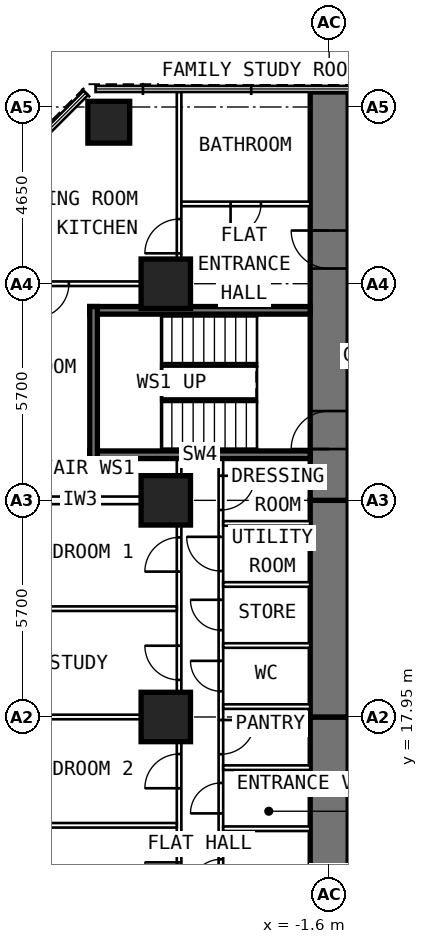
"""IFC4 building model, lengths in metres.
Left out: names, types, materials, properties, quantities, classifications, styles, units other than length and angle.
Written with IfcOpenShell. Run it as: python <this file> out.ifc"""

import sys

from ifc_helpers import new_model, si_unit, direction, frame, frame_2d, origin, origin_2d, place, context, subcontext, project, spatial, rectangle, extrude, element, fill, save


model = new_model("IFC4")
c1 = context("Model", 3, precision=1e-05, world=origin(), true_north=direction((0.0, 1.0)))
c2 = subcontext(c1, "Body", "Model", "MODEL_VIEW")
j1 = project(units=[si_unit("LENGTHUNIT", "METRE"), si_unit("PLANEANGLEUNIT", "RADIAN")], contexts=[c1])
p1 = place(None, origin())
s1 = spatial("IfcSite", under=j1, at=p1, CompositionType="ELEMENT")
p2 = place(p1, origin())
s2 = spatial("IfcBuilding", under=s1, at=p2, CompositionType="ELEMENT")
p3 = place(p2, frame((0.0, 0.0, 43.0)))
s3 = spatial("IfcBuildingStorey", under=s2, at=p3, CompositionType="ELEMENT", Elevation=43.0)
p4 = place(p3, frame((-7.4, 33.6, 0.0), z_axis=(0.0, 0.0, 1.0), x_axis=(0.0, 1.0, 0.0)))
e1 = element("IfcColumn", 1, at=p4, inside=s3, PredefinedType="COLUMN", context=c2, shape_type="SweptSolid", body=[
    extrude(rectangle(XDim=1.1, YDim=1.1, at=origin_2d()), origin(), (0.0, 0.0, 1.0), 3.6),
])
for number, where, z_axis, x_axis in (
    (2, (-5.9, 17.95, 0.0), (0.0, 0.0, 1.0), (0.0, 1.0, 0.0)),
    (3, (-5.9, 23.65, 0.0), (0.0, 0.0, 1.0), (0.0, 1.0, 0.0)),
    (4, (-5.9, 29.35, 0.0), (0.0, 0.0, 1.0), (0.0, 1.0, 0.0)),
):
    element("IfcColumn", number, at=place(p3, frame(where, z_axis=z_axis, x_axis=x_axis)), inside=s3, PredefinedType="COLUMN", context=c2, shape_type="SweptSolid", body=[
        extrude(rectangle(XDim=1.3, YDim=1.3, at=origin_2d()), origin(), (0.0, 0.0, 1.0), 3.6),
    ])
p5 = place(p3, frame((-1.6, 9.6, 0.0), z_axis=(0.0, 0.0, 1.0), x_axis=(0.0, 1.0, 0.0)))
e5 = element("IfcWall", 5, at=p5, inside=s3, PredefinedType="SHEAR", context=c2, shape_type="SweptSolid", body=[
    extrude(rectangle(XDim=8.35, YDim=1.0, at=frame_2d((4.175, 0.0))), origin(), (0.0, 0.0, 1.0), 3.6),
])
p6 = place(p5, frame((1.3, 0.0, 0.0)))
e6 = element("IfcOpeningElement", 6, at=p6, cuts=e5, PredefinedType="OPENING", context=c2, shape_type="SweptSolid", body=[
    extrude(rectangle(XDim=1.0, YDim=2.1, at=frame_2d((0.5, 1.05))), frame((0.0, 0.512, 0.0), z_axis=(0.0, -1.0, 0.0), x_axis=(1.0, 0.0, 0.0)), (0.0, 0.0, 1.0), 1.024),
])
p7 = place(p3, frame((-1.6, 17.95, 0.0), z_axis=(0.0, 0.0, 1.0), x_axis=(0.0, 1.0, 0.0)))
e7 = element("IfcWall", 7, at=p7, inside=s3, PredefinedType="SHEAR", context=c2, shape_type="SweptSolid", body=[
    extrude(rectangle(XDim=5.7, YDim=1.0, at=frame_2d((2.85, 0.0))), origin(), (0.0, 0.0, 1.0), 3.6),
])
p8 = place(p3, frame((-1.6, 23.65, 0.0), z_axis=(0.0, 0.0, 1.0), x_axis=(0.0, 1.0, 0.0)))
e8 = element("IfcWall", 8, at=p8, inside=s3, PredefinedType="SHEAR", context=c2, shape_type="SweptSolid", body=[
    extrude(rectangle(XDim=10.745, YDim=1.0, at=frame_2d((5.373, 0.0))), origin(), (0.0, 0.0, 1.0), 3.6),
])
p9 = place(p8, frame((6.1, 0.0, 0.0)))
e9 = element("IfcOpeningElement", 9, at=p9, cuts=e8, PredefinedType="OPENING", context=c2, shape_type="SweptSolid", body=[
    extrude(rectangle(XDim=1.0, YDim=2.1, at=frame_2d((0.5, 1.05))), frame((0.0, 0.512, 0.0), z_axis=(0.0, -1.0, 0.0), x_axis=(1.0, 0.0, 0.0)), (0.0, 0.0, 1.0), 1.024),
])
p10 = place(p8, frame((1.35, 0.0, 0.0)))
e10 = element("IfcOpeningElement", 10, at=p10, cuts=e8, PredefinedType="OPENING", context=c2, shape_type="SweptSolid", body=[
    extrude(rectangle(XDim=1.0, YDim=2.1, at=frame_2d((0.5, 1.05))), frame((0.0, 0.512, 0.0), z_axis=(0.0, -1.0, 0.0), x_axis=(1.0, 0.0, 0.0)), (0.0, 0.0, 1.0), 1.024),
])
p11 = place(p3, frame((-4.45, 10.1, 0.0), z_axis=(0.0, 0.0, 1.0), x_axis=(0.0, 1.0, 0.0)))
e11 = element("IfcWall", 11, at=p11, inside=s3, PredefinedType="PARTITIONING", context=c2, shape_type="SweptSolid", body=[
    extrude(rectangle(XDim=14.65, YDim=0.12, at=frame_2d((7.325, 0.0))), origin(), (0.0, 0.0, 1.0), 3.35),
])
p12 = place(p11, frame((0.75, 0.0, 0.0)))
e12 = element("IfcOpeningElement", 12, at=p12, cuts=e11, PredefinedType="OPENING", context=c2, shape_type="SweptSolid", body=[
    extrude(rectangle(XDim=0.9, YDim=2.1, at=frame_2d((0.45, 1.05))), frame((0.0, 0.072, 0.0), z_axis=(0.0, -1.0, 0.0), x_axis=(1.0, 0.0, 0.0)), (0.0, 0.0, 1.0), 0.144),
])
p13 = place(p11, frame((3.305, 0.0, 0.0)))
e13 = element("IfcOpeningElement", 13, at=p13, cuts=e11, PredefinedType="OPENING", context=c2, shape_type="SweptSolid", body=[
    extrude(rectangle(XDim=0.8, YDim=2.1, at=frame_2d((0.4, 1.05))), frame((0.0, 0.072, 0.0), z_axis=(0.0, -1.0, 0.0), x_axis=(1.0, 0.0, 0.0)), (0.0, 0.0, 1.0), 0.144),
])
p14 = place(p11, frame((5.313, 0.0, 0.0)))
e14 = element("IfcOpeningElement", 14, at=p14, cuts=e11, PredefinedType="OPENING", context=c2, shape_type="SweptSolid", body=[
    extrude(rectangle(XDim=0.8, YDim=2.1, at=frame_2d((0.4, 1.05))), frame((0.0, 0.072, 0.0), z_axis=(0.0, -1.0, 0.0), x_axis=(1.0, 0.0, 0.0)), (0.0, 0.0, 1.0), 0.144),
])
p15 = place(p11, frame((6.87, 0.0, 0.0)))
e15 = element("IfcOpeningElement", 15, at=p15, cuts=e11, PredefinedType="OPENING", context=c2, shape_type="SweptSolid", body=[
    extrude(rectangle(XDim=0.9, YDim=2.1, at=frame_2d((0.45, 1.05))), frame((0.0, 0.072, 0.0), z_axis=(0.0, -1.0, 0.0), x_axis=(1.0, 0.0, 0.0)), (0.0, 0.0, 1.0), 0.144),
])
p16 = place(p11, frame((8.527, 0.0, 0.0)))
e16 = element("IfcOpeningElement", 16, at=p16, cuts=e11, PredefinedType="OPENING", context=c2, shape_type="SweptSolid", body=[
    extrude(rectangle(XDim=0.8, YDim=2.1, at=frame_2d((0.4, 1.05))), frame((0.0, 0.072, 0.0), z_axis=(0.0, -1.0, 0.0), x_axis=(1.0, 0.0, 0.0)), (0.0, 0.0, 1.0), 0.144),
])
p17 = place(p11, frame((10.133, 0.0, 0.0)))
e17 = element("IfcOpeningElement", 17, at=p17, cuts=e11, PredefinedType="OPENING", context=c2, shape_type="SweptSolid", body=[
    extrude(rectangle(XDim=0.8, YDim=2.1, at=frame_2d((0.4, 1.05))), frame((0.0, 0.072, 0.0), z_axis=(0.0, -1.0, 0.0), x_axis=(1.0, 0.0, 0.0)), (0.0, 0.0, 1.0), 0.144),
])
p18 = place(p11, frame((11.69, 0.0, 0.0)))
e18 = element("IfcOpeningElement", 18, at=p18, cuts=e11, PredefinedType="OPENING", context=c2, shape_type="SweptSolid", body=[
    extrude(rectangle(XDim=0.9, YDim=2.1, at=frame_2d((0.45, 1.05))), frame((0.0, 0.072, 0.0), z_axis=(0.0, -1.0, 0.0), x_axis=(1.0, 0.0, 0.0)), (0.0, 0.0, 1.0), 0.144),
])
p19 = place(p11, frame((13.297, 0.0, 0.0)))
e19 = element("IfcOpeningElement", 19, at=p19, cuts=e11, PredefinedType="OPENING", context=c2, shape_type="SweptSolid", body=[
    extrude(rectangle(XDim=0.9, YDim=2.1, at=frame_2d((0.45, 1.05))), frame((0.0, 0.072, 0.0), z_axis=(0.0, -1.0, 0.0), x_axis=(1.0, 0.0, 0.0)), (0.0, 0.0, 1.0), 0.144),
])
p20 = place(p3, frame((-5.55, 9.691, 0.0), z_axis=(0.0, 0.0, 1.0), x_axis=(0.0, 1.0, 0.0)))
e20 = element("IfcWall", 20, at=p20, inside=s3, PredefinedType="PARTITIONING", context=c2, shape_type="SweptSolid", body=[
    extrude(rectangle(XDim=15.059, YDim=0.12, at=frame_2d((7.53, 0.0))), origin(), (0.0, 0.0, 1.0), 3.35),
])
p21 = place(p20, frame((0.859, 0.0, 0.0)))
e21 = element("IfcOpeningElement", 21, at=p21, cuts=e20, PredefinedType="OPENING", context=c2, shape_type="SweptSolid", body=[
    extrude(rectangle(XDim=0.9, YDim=2.1, at=frame_2d((0.45, 1.05))), frame((0.0, 0.072, 0.0), z_axis=(0.0, -1.0, 0.0), x_axis=(1.0, 0.0, 0.0)), (0.0, 0.0, 1.0), 0.144),
])
p22 = place(p20, frame((3.534, 0.0, 0.0)))
e22 = element("IfcOpeningElement", 22, at=p22, cuts=e20, PredefinedType="OPENING", context=c2, shape_type="SweptSolid", body=[
    extrude(rectangle(XDim=0.9, YDim=2.1, at=frame_2d((0.45, 1.05))), frame((0.0, 0.072, 0.0), z_axis=(0.0, -1.0, 0.0), x_axis=(1.0, 0.0, 0.0)), (0.0, 0.0, 1.0), 0.144),
])
p23 = place(p20, frame((6.384, 0.0, 0.0)))
e23 = element("IfcOpeningElement", 23, at=p23, cuts=e20, PredefinedType="OPENING", context=c2, shape_type="SweptSolid", body=[
    extrude(rectangle(XDim=0.9, YDim=2.1, at=frame_2d((0.45, 1.05))), frame((0.0, 0.072, 0.0), z_axis=(0.0, -1.0, 0.0), x_axis=(1.0, 0.0, 0.0)), (0.0, 0.0, 1.0), 0.144),
])
p24 = place(p20, frame((9.234, 0.0, 0.0)))
e24 = element("IfcOpeningElement", 24, at=p24, cuts=e20, PredefinedType="OPENING", context=c2, shape_type="SweptSolid", body=[
    extrude(rectangle(XDim=0.9, YDim=2.1, at=frame_2d((0.45, 1.05))), frame((0.0, 0.072, 0.0), z_axis=(0.0, -1.0, 0.0), x_axis=(1.0, 0.0, 0.0)), (0.0, 0.0, 1.0), 0.144),
])
p25 = place(p20, frame((12.084, 0.0, 0.0)))
e25 = element("IfcOpeningElement", 25, at=p25, cuts=e20, PredefinedType="OPENING", context=c2, shape_type="SweptSolid", body=[
    extrude(rectangle(XDim=0.9, YDim=2.1, at=frame_2d((0.45, 1.05))), frame((0.0, 0.072, 0.0), z_axis=(0.0, -1.0, 0.0), x_axis=(1.0, 0.0, 0.0)), (0.0, 0.0, 1.0), 0.144),
])
p26 = place(p3, frame((-5.61, 15.1, 0.0), z_axis=(0.0, 0.0, 1.0), x_axis=(-1.0, 0.0, 0.0)))
e26 = element("IfcWall", 26, at=p26, inside=s3, PredefinedType="PARTITIONING", context=c2, shape_type="SweptSolid", body=[
    extrude(rectangle(XDim=5.09, YDim=0.12, at=frame_2d((2.545, 0.0))), origin(), (0.0, 0.0, 1.0), 3.35),
])
p27 = place(p3, frame((-5.61, 17.95, 0.0), z_axis=(0.0, 0.0, 1.0), x_axis=(-1.0, 0.0, 0.0)))
e27 = element("IfcWall", 27, at=p27, inside=s3, PredefinedType="PARTITIONING", context=c2, shape_type="SweptSolid", body=[
    extrude(rectangle(XDim=5.09, YDim=0.12, at=frame_2d((2.545, 0.0))), origin(), (0.0, 0.0, 1.0), 2.45),
])
p28 = place(p3, frame((-5.61, 20.8, 0.0), z_axis=(0.0, 0.0, 1.0), x_axis=(-1.0, 0.0, 0.0)))
e28 = element("IfcWall", 28, at=p28, inside=s3, PredefinedType="PARTITIONING", context=c2, shape_type="SweptSolid", body=[
    extrude(rectangle(XDim=5.09, YDim=0.12, at=frame_2d((2.545, 0.0))), origin(), (0.0, 0.0, 1.0), 3.35),
])
for number, where, z_axis, x_axis in (
    (29, (-2.1, 15.01, 0.0), (0.0, 0.0, 1.0), (-1.0, 0.0, 0.0)),
    (30, (-2.1, 16.617, 0.0), (0.0, 0.0, 1.0), (-1.0, 0.0, 0.0)),
):
    element("IfcWall", number, at=place(p3, frame(where, z_axis=z_axis, x_axis=x_axis)), inside=s3, PredefinedType="PARTITIONING", context=c2, shape_type="SweptSolid", body=[
        extrude(rectangle(XDim=2.29, YDim=0.12, at=frame_2d((1.145, 0.0))), origin(), (0.0, 0.0, 1.0), 3.35),
    ])
p29 = place(p3, frame((-2.1, 18.223, 0.0), z_axis=(0.0, 0.0, 1.0), x_axis=(-1.0, 0.0, 0.0)))
e31 = element("IfcWall", 31, at=p29, inside=s3, PredefinedType="PARTITIONING", context=c2, shape_type="SweptSolid", body=[
    extrude(rectangle(XDim=2.29, YDim=0.12, at=frame_2d((1.145, 0.0))), origin(), (0.0, 0.0, 1.0), 2.45),
])
for number, where, z_axis, x_axis in (
    (32, (-2.1, 19.83, 0.0), (0.0, 0.0, 1.0), (-1.0, 0.0, 0.0)),
    (33, (-2.1, 21.437, 0.0), (0.0, 0.0, 1.0), (-1.0, 0.0, 0.0)),
    (34, (-2.1, 23.043, 0.0), (0.0, 0.0, 1.0), (-1.0, 0.0, 0.0)),
):
    element("IfcWall", number, at=place(p3, frame(where, z_axis=z_axis, x_axis=x_axis)), inside=s3, PredefinedType="PARTITIONING", context=c2, shape_type="SweptSolid", body=[
        extrude(rectangle(XDim=2.29, YDim=0.12, at=frame_2d((1.145, 0.0))), origin(), (0.0, 0.0, 1.0), 3.35),
    ])
p30 = place(p3, frame((-5.61, 23.65, 0.0), z_axis=(0.0, 0.0, 1.0), x_axis=(-1.0, 0.0, 0.0)))
e35 = element("IfcWall", 35, at=p30, inside=s3, PredefinedType="PARTITIONING", context=c2, shape_type="SweptSolid", body=[
    extrude(rectangle(XDim=5.09, YDim=0.2, at=frame_2d((2.545, 0.0))), origin(), (0.0, 0.0, 1.0), 2.45),
])
p31 = place(p3, frame((-5.61, 29.35, 0.0), z_axis=(0.0, 0.0, 1.0), x_axis=(-1.0, 0.0, 0.0)))
e36 = element("IfcWall", 36, at=p31, inside=s3, PredefinedType="PARTITIONING", context=c2, shape_type="SweptSolid", body=[
    extrude(rectangle(XDim=5.09, YDim=0.12, at=frame_2d((2.545, 0.0))), origin(), (0.0, 0.0, 1.0), 2.45),
])
p32 = place(p31, frame((2.84, 0.0, 0.0)))
e37 = element("IfcOpeningElement", 37, at=p32, cuts=e36, PredefinedType="OPENING", context=c2, shape_type="SweptSolid", body=[
    extrude(rectangle(XDim=0.9, YDim=2.1, at=frame_2d((0.45, 1.05))), frame((0.0, 0.072, 0.0), z_axis=(0.0, -1.0, 0.0), x_axis=(1.0, 0.0, 0.0)), (0.0, 0.0, 1.0), 0.144),
])
p33 = place(p3, frame((-5.55, 28.95, 0.0), z_axis=(0.0, 0.0, 1.0), x_axis=(0.0, 1.0, 0.0)))
e38 = element("IfcWall", 38, at=p33, inside=s3, PredefinedType="PARTITIONING", context=c2, shape_type="SweptSolid", body=[
    extrude(rectangle(XDim=5.445, YDim=0.12, at=frame_2d((2.723, 0.0))), origin(), (0.0, 0.0, 1.0), 3.35),
])
p34 = place(p33, frame((1.2, 0.0, 0.0)))
e39 = element("IfcOpeningElement", 39, at=p34, cuts=e38, PredefinedType="OPENING", context=c2, shape_type="SweptSolid", body=[
    extrude(rectangle(XDim=0.9, YDim=2.1, at=frame_2d((0.45, 1.05))), frame((0.0, 0.072, 0.0), z_axis=(0.0, -1.0, 0.0), x_axis=(1.0, 0.0, 0.0)), (0.0, 0.0, 1.0), 0.144),
])
p35 = place(p3, frame((-2.1, 31.45, 0.0), z_axis=(0.0, 0.0, 1.0), x_axis=(-1.0, 0.0, 0.0)))
e40 = element("IfcWall", 40, at=p35, inside=s3, PredefinedType="PARTITIONING", context=c2, shape_type="SweptSolid", body=[
    extrude(rectangle(XDim=3.39, YDim=0.12, at=frame_2d((1.695, 0.0))), origin(), (0.0, 0.0, 1.0), 3.35),
])
p36 = place(p35, frame((1.295, 0.0, 0.0)))
e41 = element("IfcOpeningElement", 41, at=p36, cuts=e40, PredefinedType="OPENING", context=c2, shape_type="SweptSolid", body=[
    extrude(rectangle(XDim=0.8, YDim=2.1, at=frame_2d((0.4, 1.05))), frame((0.0, 0.072, 0.0), z_axis=(0.0, -1.0, 0.0), x_axis=(1.0, 0.0, 0.0)), (0.0, 0.0, 1.0), 0.144),
])
for number, where, z_axis, x_axis in (
    (42, (-2.1, 24.85, 0.0), (0.0, 0.0, 1.0), (-1.0, 0.0, 0.0)),
    (43, (-2.1, 28.65, 0.0), (0.0, 0.0, 1.0), (-1.0, 0.0, 0.0)),
):
    element("IfcWall", number, at=place(p3, frame(where, z_axis=z_axis, x_axis=x_axis)), inside=s3, PredefinedType="SHEAR", context=c2, shape_type="SweptSolid", body=[
        extrude(rectangle(XDim=5.8, YDim=0.2, at=frame_2d((2.9, 0.0))), origin(), (0.0, 0.0, 1.0), 3.33),
    ])
p37 = place(p3, frame((-7.8, 24.75, 0.0), z_axis=(0.0, 0.0, 1.0), x_axis=(0.0, 1.0, 0.0)))
e44 = element("IfcWall", 44, at=p37, inside=s3, PredefinedType="SHEAR", context=c2, shape_type="SweptSolid", body=[
    extrude(rectangle(XDim=4.0, YDim=0.2, at=frame_2d((2.0, 0.0))), origin(), (0.0, 0.0, 1.0), 3.33),
])
p38 = place(p22, origin())
e45 = element("IfcDoor", 45, at=p38, inside=s3, OperationType="SINGLE_SWING_RIGHT", PredefinedType="DOOR", context=c2, shape_type="SweptSolid", body=[
    extrude(rectangle(XDim=0.9, YDim=2.1, at=frame_2d((0.45, 1.05))), frame((0.0, 0.025, 0.0), z_axis=(0.0, -1.0, 0.0), x_axis=(1.0, 0.0, 0.0)), (0.0, 0.0, 1.0), 0.05),
])
fill(e22, e45)
p39 = place(p23, origin())
e46 = element("IfcDoor", 46, at=p39, inside=s3, OperationType="SINGLE_SWING_LEFT", PredefinedType="DOOR", context=c2, shape_type="SweptSolid", body=[
    extrude(rectangle(XDim=0.9, YDim=2.1, at=frame_2d((0.45, 1.05))), frame((0.0, 0.025, 0.0), z_axis=(0.0, -1.0, 0.0), x_axis=(1.0, 0.0, 0.0)), (0.0, 0.0, 1.0), 0.05),
])
fill(e23, e46)
p40 = place(p24, origin())
e47 = element("IfcDoor", 47, at=p40, inside=s3, OperationType="SINGLE_SWING_RIGHT", PredefinedType="DOOR", context=c2, shape_type="SweptSolid", body=[
    extrude(rectangle(XDim=0.9, YDim=2.1, at=frame_2d((0.45, 1.05))), frame((0.0, 0.025, 0.0), z_axis=(0.0, -1.0, 0.0), x_axis=(1.0, 0.0, 0.0)), (0.0, 0.0, 1.0), 0.05),
])
fill(e24, e47)
p41 = place(p25, origin())
e48 = element("IfcDoor", 48, at=p41, inside=s3, OperationType="SINGLE_SWING_LEFT", PredefinedType="DOOR", context=c2, shape_type="SweptSolid", body=[
    extrude(rectangle(XDim=0.9, YDim=2.1, at=frame_2d((0.45, 1.05))), frame((0.0, 0.025, 0.0), z_axis=(0.0, -1.0, 0.0), x_axis=(1.0, 0.0, 0.0)), (0.0, 0.0, 1.0), 0.05),
])
fill(e25, e48)
p42 = place(p13, origin())
e49 = element("IfcDoor", 49, at=p42, inside=s3, OperationType="SINGLE_SWING_LEFT", PredefinedType="DOOR", context=c2, shape_type="SweptSolid", body=[
    extrude(rectangle(XDim=0.8, YDim=2.1, at=frame_2d((0.4, 1.05))), frame((0.0, 0.025, 0.0), z_axis=(0.0, -1.0, 0.0), x_axis=(1.0, 0.0, 0.0)), (0.0, 0.0, 1.0), 0.05),
])
fill(e13, e49)
p43 = place(p14, origin())
e50 = element("IfcDoor", 50, at=p43, inside=s3, OperationType="SINGLE_SWING_LEFT", PredefinedType="DOOR", context=c2, shape_type="SweptSolid", body=[
    extrude(rectangle(XDim=0.8, YDim=2.1, at=frame_2d((0.4, 1.05))), frame((0.0, 0.025, 0.0), z_axis=(0.0, -1.0, 0.0), x_axis=(1.0, 0.0, 0.0)), (0.0, 0.0, 1.0), 0.05),
])
fill(e14, e50)
p44 = place(p15, frame((0.9, 0.0, 0.0), z_axis=(0.0, 0.0, 1.0), x_axis=(-1.0, 0.0, 0.0)))
e51 = element("IfcDoor", 51, at=p44, inside=s3, OperationType="SINGLE_SWING_LEFT", PredefinedType="DOOR", context=c2, shape_type="SweptSolid", body=[
    extrude(rectangle(XDim=0.9, YDim=2.1, at=frame_2d((0.45, 1.05))), frame((0.0, 0.025, 0.0), z_axis=(0.0, -1.0, 0.0), x_axis=(1.0, 0.0, 0.0)), (0.0, 0.0, 1.0), 0.05),
])
fill(e15, e51)
p45 = place(p16, origin())
e52 = element("IfcDoor", 52, at=p45, inside=s3, OperationType="SINGLE_SWING_RIGHT", PredefinedType="DOOR", context=c2, shape_type="SweptSolid", body=[
    extrude(rectangle(XDim=0.8, YDim=2.1, at=frame_2d((0.4, 1.05))), frame((0.0, 0.025, 0.0), z_axis=(0.0, -1.0, 0.0), x_axis=(1.0, 0.0, 0.0)), (0.0, 0.0, 1.0), 0.05),
])
fill(e16, e52)
p46 = place(p17, origin())
e53 = element("IfcDoor", 53, at=p46, inside=s3, OperationType="SINGLE_SWING_RIGHT", PredefinedType="DOOR", context=c2, shape_type="SweptSolid", body=[
    extrude(rectangle(XDim=0.8, YDim=2.1, at=frame_2d((0.4, 1.05))), frame((0.0, 0.025, 0.0), z_axis=(0.0, -1.0, 0.0), x_axis=(1.0, 0.0, 0.0)), (0.0, 0.0, 1.0), 0.05),
])
fill(e17, e53)
p47 = place(p18, origin())
e54 = element("IfcDoor", 54, at=p47, inside=s3, OperationType="SINGLE_SWING_RIGHT", PredefinedType="DOOR", context=c2, shape_type="SweptSolid", body=[
    extrude(rectangle(XDim=0.9, YDim=2.1, at=frame_2d((0.45, 1.05))), frame((0.0, 0.025, 0.0), z_axis=(0.0, -1.0, 0.0), x_axis=(1.0, 0.0, 0.0)), (0.0, 0.0, 1.0), 0.05),
])
fill(e18, e54)
p48 = place(p19, frame((0.9, 0.0, 0.0), z_axis=(0.0, 0.0, 1.0), x_axis=(-1.0, 0.0, 0.0)))
e55 = element("IfcDoor", 55, at=p48, inside=s3, OperationType="SINGLE_SWING_LEFT", PredefinedType="DOOR", context=c2, shape_type="SweptSolid", body=[
    extrude(rectangle(XDim=0.9, YDim=2.1, at=frame_2d((0.45, 1.05))), frame((0.0, 0.025, 0.0), z_axis=(0.0, -1.0, 0.0), x_axis=(1.0, 0.0, 0.0)), (0.0, 0.0, 1.0), 0.05),
])
fill(e19, e55)
p49 = place(p32, origin())
e56 = element("IfcDoor", 56, at=p49, inside=s3, OperationType="SINGLE_SWING_RIGHT", PredefinedType="DOOR", context=c2, shape_type="SweptSolid", body=[
    extrude(rectangle(XDim=0.9, YDim=2.1, at=frame_2d((0.45, 1.05))), frame((0.0, 0.025, 0.0), z_axis=(0.0, -1.0, 0.0), x_axis=(1.0, 0.0, 0.0)), (0.0, 0.0, 1.0), 0.05),
])
fill(e37, e56)
p50 = place(p34, origin())
e57 = element("IfcDoor", 57, at=p50, inside=s3, OperationType="SINGLE_SWING_LEFT", PredefinedType="DOOR", context=c2, shape_type="SweptSolid", body=[
    extrude(rectangle(XDim=0.9, YDim=2.1, at=frame_2d((0.45, 1.05))), frame((0.0, 0.025, 0.0), z_axis=(0.0, -1.0, 0.0), x_axis=(1.0, 0.0, 0.0)), (0.0, 0.0, 1.0), 0.05),
])
fill(e39, e57)
p51 = place(p36, origin())
e58 = element("IfcDoor", 58, at=p51, inside=s3, OperationType="SINGLE_SWING_RIGHT", PredefinedType="DOOR", context=c2, shape_type="SweptSolid", body=[
    extrude(rectangle(XDim=0.8, YDim=2.1, at=frame_2d((0.4, 1.05))), frame((0.0, 0.025, 0.0), z_axis=(0.0, -1.0, 0.0), x_axis=(1.0, 0.0, 0.0)), (0.0, 0.0, 1.0), 0.05),
])
fill(e41, e58)
p52 = place(p9, origin())
e59 = element("IfcDoor", 59, at=p52, inside=s3, OperationType="SINGLE_SWING_RIGHT", PredefinedType="DOOR", context=c2, shape_type="SweptSolid", body=[
    extrude(rectangle(XDim=1.0, YDim=2.1, at=frame_2d((0.5, 1.05))), frame((0.0, 0.25, 0.0), z_axis=(0.0, -1.0, 0.0), x_axis=(1.0, 0.0, 0.0)), (0.0, 0.0, 1.0), 0.5),
])
fill(e9, e59)
p53 = place(p10, origin())
e60 = element("IfcDoor", 60, at=p53, inside=s3, OperationType="SINGLE_SWING_LEFT", PredefinedType="DOOR", context=c2, shape_type="SweptSolid", body=[
    extrude(rectangle(XDim=1.0, YDim=2.1, at=frame_2d((0.5, 1.05))), frame((0.0, 0.25, 0.0), z_axis=(0.0, -1.0, 0.0), x_axis=(1.0, 0.0, 0.0)), (0.0, 0.0, 1.0), 0.5),
])
fill(e10, e60)
save(model, sys.argv[1])
